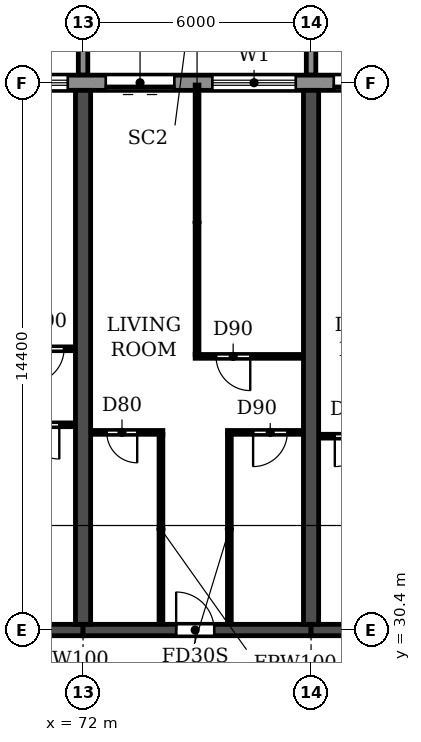
"""IFC4 building model, lengths in metres.
Left out: names, types, materials, properties, quantities, classifications, styles, units other than length and angle.
Written with IfcOpenShell. Run it as: python <this file> out.ifc"""

import sys

from ifc_helpers import new_model, si_unit, direction, frame, frame_2d, origin, place, context, subcontext, project, spatial, polyline, rectangle, outline, extrude, source, transform, mapped, element, fill, save


model = new_model("IFC4")
c1 = context("Model", 3, precision=1e-05, world=origin(), true_north=direction((0.0, 1.0)))
c2 = subcontext(c1, "Body", "Model", "MODEL_VIEW")
j1 = project(units=[si_unit("LENGTHUNIT", "METRE"), si_unit("PLANEANGLEUNIT", "RADIAN")], contexts=[c1])
p1 = place(None, origin())
s1 = spatial("IfcSite", under=j1, at=p1, CompositionType="ELEMENT")
p2 = place(p1, origin())
s2 = spatial("IfcBuilding", under=s1, at=p2, CompositionType="ELEMENT")
p3 = place(p2, frame((0.0, 0.0, 63.0)))
s3 = spatial("IfcBuildingStorey", under=s2, at=p3, CompositionType="ELEMENT", Elevation=63.0)
for number, where, z_axis, x_axis in (
    (1, (72.0, 30.55, 0.0), (0.0, 0.0, 1.0), (0.0, 1.0, 0.0)),
    (2, (78.0, 30.55, 0.0), (0.0, 0.0, 1.0), (0.0, 1.0, 0.0)),
):
    element("IfcWall", number, at=place(p3, frame(where, z_axis=z_axis, x_axis=x_axis)), inside=s3, PredefinedType="SHEAR", context=c2, shape_type="SweptSolid", body=[
        extrude(rectangle(XDim=14.05, YDim=0.4, at=frame_2d((7.025, 0.0))), origin(), (0.0, 0.0, 1.0), 2.95),
    ])
p4 = place(p3, frame((66.0, 30.4, 0.0), z_axis=(0.0, 0.0, 1.0), x_axis=(1.0, 0.0, 0.0)))
e3 = element("IfcWall", 3, at=p4, inside=s3, PredefinedType="SHEAR", context=c2, shape_type="SweptSolid", body=[
    extrude(rectangle(XDim=6.0, YDim=0.3, at=frame_2d((3.0, 0.0))), origin(), (0.0, 0.0, 1.0), 2.35),
])
p5 = place(p4, frame((2.45, 0.0, 0.0)))
e4 = element("IfcOpeningElement", 4, at=p5, cuts=e3, PredefinedType="OPENING", context=c2, shape_type="SweptSolid", body=[
    extrude(rectangle(XDim=1.0, YDim=2.1, at=frame_2d((0.5, 1.05))), frame((0.0, 0.16, 0.0), z_axis=(0.0, -1.0, 0.0), x_axis=(1.0, 0.0, 0.0)), (0.0, 0.0, 1.0), 0.32),
])
p6 = place(p3, frame((72.0, 30.4, 0.0), z_axis=(0.0, 0.0, 1.0), x_axis=(1.0, 0.0, 0.0)))
e5 = element("IfcWall", 5, at=p6, inside=s3, PredefinedType="SHEAR", context=c2, shape_type="SweptSolid", body=[
    extrude(rectangle(XDim=6.0, YDim=0.3, at=frame_2d((3.0, 0.0))), origin(), (0.0, 0.0, 1.0), 2.35),
])
p7 = place(p6, frame((2.45, 0.0, 0.0)))
e6 = element("IfcOpeningElement", 6, at=p7, cuts=e5, PredefinedType="OPENING", context=c2, shape_type="SweptSolid", body=[
    extrude(rectangle(XDim=1.0, YDim=2.1, at=frame_2d((0.5, 1.05))), frame((0.0, 0.16, 0.0), z_axis=(0.0, -1.0, 0.0), x_axis=(1.0, 0.0, 0.0)), (0.0, 0.0, 1.0), 0.32),
])
p8 = place(p3, frame((78.0, 30.4, 0.0), z_axis=(0.0, 0.0, 1.0), x_axis=(1.0, 0.0, 0.0)))
e7 = element("IfcWall", 7, at=p8, inside=s3, PredefinedType="SHEAR", context=c2, shape_type="SweptSolid", body=[
    extrude(rectangle(XDim=6.0, YDim=0.3, at=frame_2d((3.0, 0.0))), origin(), (0.0, 0.0, 1.0), 2.35),
])
p9 = place(p8, frame((2.45, 0.0, 0.0)))
e8 = element("IfcOpeningElement", 8, at=p9, cuts=e7, PredefinedType="OPENING", context=c2, shape_type="SweptSolid", body=[
    extrude(rectangle(XDim=1.0, YDim=2.1, at=frame_2d((0.5, 1.05))), frame((0.0, 0.16, 0.0), z_axis=(0.0, -1.0, 0.0), x_axis=(1.0, 0.0, 0.0)), (0.0, 0.0, 1.0), 0.32),
])
p10 = place(p3, frame((91.317, 44.8, 0.0), z_axis=(0.0, 0.0, 1.0), x_axis=(-1.0, 0.0, 0.0)))
e9 = element("IfcWall", 9, at=p10, inside=s3, PredefinedType="STANDARD", context=c2, shape_type="SweptSolid", body=[
    extrude(rectangle(XDim=80.634, YDim=0.4, at=frame_2d((40.317, 0.0))), origin(), (0.0, 0.0, 1.0), 2.95),
])
p11 = place(p10, frame((76.717, 0.0, 0.9)))
e10 = element("IfcOpeningElement", 10, at=p11, cuts=e9, PredefinedType="OPENING", context=c2, shape_type="SweptSolid", body=[
    extrude(rectangle(XDim=2.2, YDim=1.5, at=frame_2d((1.1, 0.75))), frame((0.0, 0.21, 0.0), z_axis=(0.0, -1.0, 0.0), x_axis=(1.0, 0.0, 0.0)), (0.0, 0.0, 1.0), 0.42),
])
p12 = place(p10, frame((73.917, 0.0, 0.0)))
e11 = element("IfcOpeningElement", 11, at=p12, cuts=e9, PredefinedType="OPENING", context=c2, shape_type="SweptSolid", body=[
    extrude(rectangle(XDim=1.8, YDim=2.4, at=frame_2d((0.9, 1.2))), frame((0.0, 0.21, 0.0), z_axis=(0.0, -1.0, 0.0), x_axis=(1.0, 0.0, 0.0)), (0.0, 0.0, 1.0), 0.42),
])
p13 = place(p10, frame((70.717, 0.0, 0.9)))
e12 = element("IfcOpeningElement", 12, at=p13, cuts=e9, PredefinedType="OPENING", context=c2, shape_type="SweptSolid", body=[
    extrude(rectangle(XDim=2.2, YDim=1.5, at=frame_2d((1.1, 0.75))), frame((0.0, 0.21, 0.0), z_axis=(0.0, -1.0, 0.0), x_axis=(1.0, 0.0, 0.0)), (0.0, 0.0, 1.0), 0.42),
])
p14 = place(p10, frame((67.917, 0.0, 0.0)))
e13 = element("IfcOpeningElement", 13, at=p14, cuts=e9, PredefinedType="OPENING", context=c2, shape_type="SweptSolid", body=[
    extrude(rectangle(XDim=1.8, YDim=2.4, at=frame_2d((0.9, 1.2))), frame((0.0, 0.21, 0.0), z_axis=(0.0, -1.0, 0.0), x_axis=(1.0, 0.0, 0.0)), (0.0, 0.0, 1.0), 0.42),
])
p15 = place(p10, frame((64.717, 0.0, 0.9)))
e14 = element("IfcOpeningElement", 14, at=p15, cuts=e9, PredefinedType="OPENING", context=c2, shape_type="SweptSolid", body=[
    extrude(rectangle(XDim=2.2, YDim=1.5, at=frame_2d((1.1, 0.75))), frame((0.0, 0.21, 0.0), z_axis=(0.0, -1.0, 0.0), x_axis=(1.0, 0.0, 0.0)), (0.0, 0.0, 1.0), 0.42),
])
p16 = place(p10, frame((61.917, 0.0, 0.0)))
e15 = element("IfcOpeningElement", 15, at=p16, cuts=e9, PredefinedType="OPENING", context=c2, shape_type="SweptSolid", body=[
    extrude(rectangle(XDim=1.8, YDim=2.4, at=frame_2d((0.9, 1.2))), frame((0.0, 0.21, 0.0), z_axis=(0.0, -1.0, 0.0), x_axis=(1.0, 0.0, 0.0)), (0.0, 0.0, 1.0), 0.42),
])
p17 = place(p10, frame((58.717, 0.0, 0.9)))
e16 = element("IfcOpeningElement", 16, at=p17, cuts=e9, PredefinedType="OPENING", context=c2, shape_type="SweptSolid", body=[
    extrude(rectangle(XDim=2.2, YDim=1.5, at=frame_2d((1.1, 0.75))), frame((0.0, 0.21, 0.0), z_axis=(0.0, -1.0, 0.0), x_axis=(1.0, 0.0, 0.0)), (0.0, 0.0, 1.0), 0.42),
])
p18 = place(p10, frame((55.717, 0.0, 0.9)))
e17 = element("IfcOpeningElement", 17, at=p18, cuts=e9, PredefinedType="OPENING", context=c2, shape_type="SweptSolid", body=[
    extrude(rectangle(XDim=2.2, YDim=1.5, at=frame_2d((1.1, 0.75))), frame((0.0, 0.21, 0.0), z_axis=(0.0, -1.0, 0.0), x_axis=(1.0, 0.0, 0.0)), (0.0, 0.0, 1.0), 0.42),
])
p19 = place(p10, frame((52.917, 0.0, 0.0)))
e18 = element("IfcOpeningElement", 18, at=p19, cuts=e9, PredefinedType="OPENING", context=c2, shape_type="SweptSolid", body=[
    extrude(rectangle(XDim=1.8, YDim=2.4, at=frame_2d((0.9, 1.2))), frame((0.0, 0.21, 0.0), z_axis=(0.0, -1.0, 0.0), x_axis=(1.0, 0.0, 0.0)), (0.0, 0.0, 1.0), 0.42),
])
p20 = place(p10, frame((49.717, 0.0, 0.9)))
e19 = element("IfcOpeningElement", 19, at=p20, cuts=e9, PredefinedType="OPENING", context=c2, shape_type="SweptSolid", body=[
    extrude(rectangle(XDim=2.2, YDim=1.5, at=frame_2d((1.1, 0.75))), frame((0.0, 0.21, 0.0), z_axis=(0.0, -1.0, 0.0), x_axis=(1.0, 0.0, 0.0)), (0.0, 0.0, 1.0), 0.42),
])
p21 = place(p10, frame((46.917, 0.0, 0.0)))
e20 = element("IfcOpeningElement", 20, at=p21, cuts=e9, PredefinedType="OPENING", context=c2, shape_type="SweptSolid", body=[
    extrude(rectangle(XDim=1.8, YDim=2.4, at=frame_2d((0.9, 1.2))), frame((0.0, 0.21, 0.0), z_axis=(0.0, -1.0, 0.0), x_axis=(1.0, 0.0, 0.0)), (0.0, 0.0, 1.0), 0.42),
])
p22 = place(p10, frame((43.717, 0.0, 0.9)))
e21 = element("IfcOpeningElement", 21, at=p22, cuts=e9, PredefinedType="OPENING", context=c2, shape_type="SweptSolid", body=[
    extrude(rectangle(XDim=2.2, YDim=1.5, at=frame_2d((1.1, 0.75))), frame((0.0, 0.21, 0.0), z_axis=(0.0, -1.0, 0.0), x_axis=(1.0, 0.0, 0.0)), (0.0, 0.0, 1.0), 0.42),
])
p23 = place(p10, frame((40.717, 0.0, 0.9)))
e22 = element("IfcOpeningElement", 22, at=p23, cuts=e9, PredefinedType="OPENING", context=c2, shape_type="SweptSolid", body=[
    extrude(rectangle(XDim=2.2, YDim=1.5, at=frame_2d((1.1, 0.75))), frame((0.0, 0.21, 0.0), z_axis=(0.0, -1.0, 0.0), x_axis=(1.0, 0.0, 0.0)), (0.0, 0.0, 1.0), 0.42),
])
p24 = place(p10, frame((37.717, 0.0, 0.9)))
e23 = element("IfcOpeningElement", 23, at=p24, cuts=e9, PredefinedType="OPENING", context=c2, shape_type="SweptSolid", body=[
    extrude(rectangle(XDim=2.2, YDim=1.5, at=frame_2d((1.1, 0.75))), frame((0.0, 0.21, 0.0), z_axis=(0.0, -1.0, 0.0), x_axis=(1.0, 0.0, 0.0)), (0.0, 0.0, 1.0), 0.42),
])
p25 = place(p10, frame((34.717, 0.0, 0.9)))
e24 = element("IfcOpeningElement", 24, at=p25, cuts=e9, PredefinedType="OPENING", context=c2, shape_type="SweptSolid", body=[
    extrude(rectangle(XDim=2.2, YDim=1.5, at=frame_2d((1.1, 0.75))), frame((0.0, 0.21, 0.0), z_axis=(0.0, -1.0, 0.0), x_axis=(1.0, 0.0, 0.0)), (0.0, 0.0, 1.0), 0.42),
])
p26 = place(p10, frame((31.917, 0.0, 0.0)))
e25 = element("IfcOpeningElement", 25, at=p26, cuts=e9, PredefinedType="OPENING", context=c2, shape_type="SweptSolid", body=[
    extrude(rectangle(XDim=1.8, YDim=2.4, at=frame_2d((0.9, 1.2))), frame((0.0, 0.21, 0.0), z_axis=(0.0, -1.0, 0.0), x_axis=(1.0, 0.0, 0.0)), (0.0, 0.0, 1.0), 0.42),
])
p27 = place(p10, frame((28.917, 0.0, 0.0)))
e26 = element("IfcOpeningElement", 26, at=p27, cuts=e9, PredefinedType="OPENING", context=c2, shape_type="SweptSolid", body=[
    extrude(rectangle(XDim=1.8, YDim=2.4, at=frame_2d((0.9, 1.2))), frame((0.0, 0.21, 0.0), z_axis=(0.0, -1.0, 0.0), x_axis=(1.0, 0.0, 0.0)), (0.0, 0.0, 1.0), 0.42),
])
p28 = place(p10, frame((25.717, 0.0, 0.9)))
e27 = element("IfcOpeningElement", 27, at=p28, cuts=e9, PredefinedType="OPENING", context=c2, shape_type="SweptSolid", body=[
    extrude(rectangle(XDim=2.2, YDim=1.5, at=frame_2d((1.1, 0.75))), frame((0.0, 0.21, 0.0), z_axis=(0.0, -1.0, 0.0), x_axis=(1.0, 0.0, 0.0)), (0.0, 0.0, 1.0), 0.42),
])
p29 = place(p10, frame((22.917, 0.0, 0.0)))
e28 = element("IfcOpeningElement", 28, at=p29, cuts=e9, PredefinedType="OPENING", context=c2, shape_type="SweptSolid", body=[
    extrude(rectangle(XDim=1.8, YDim=2.4, at=frame_2d((0.9, 1.2))), frame((0.0, 0.21, 0.0), z_axis=(0.0, -1.0, 0.0), x_axis=(1.0, 0.0, 0.0)), (0.0, 0.0, 1.0), 0.42),
])
p30 = place(p10, frame((19.717, 0.0, 0.9)))
e29 = element("IfcOpeningElement", 29, at=p30, cuts=e9, PredefinedType="OPENING", context=c2, shape_type="SweptSolid", body=[
    extrude(rectangle(XDim=2.2, YDim=1.5, at=frame_2d((1.1, 0.75))), frame((0.0, 0.21, 0.0), z_axis=(0.0, -1.0, 0.0), x_axis=(1.0, 0.0, 0.0)), (0.0, 0.0, 1.0), 0.42),
])
p31 = place(p10, frame((16.917, 0.0, 0.0)))
e30 = element("IfcOpeningElement", 30, at=p31, cuts=e9, PredefinedType="OPENING", context=c2, shape_type="SweptSolid", body=[
    extrude(rectangle(XDim=1.8, YDim=2.4, at=frame_2d((0.9, 1.2))), frame((0.0, 0.21, 0.0), z_axis=(0.0, -1.0, 0.0), x_axis=(1.0, 0.0, 0.0)), (0.0, 0.0, 1.0), 0.42),
])
p32 = place(p10, frame((13.717, 0.0, 0.9)))
e31 = element("IfcOpeningElement", 31, at=p32, cuts=e9, PredefinedType="OPENING", context=c2, shape_type="SweptSolid", body=[
    extrude(rectangle(XDim=2.2, YDim=1.5, at=frame_2d((1.1, 0.75))), frame((0.0, 0.21, 0.0), z_axis=(0.0, -1.0, 0.0), x_axis=(1.0, 0.0, 0.0)), (0.0, 0.0, 1.0), 0.42),
])
p33 = place(p10, frame((10.917, 0.0, 0.0)))
e32 = element("IfcOpeningElement", 32, at=p33, cuts=e9, PredefinedType="OPENING", context=c2, shape_type="SweptSolid", body=[
    extrude(rectangle(XDim=1.8, YDim=2.4, at=frame_2d((0.9, 1.2))), frame((0.0, 0.21, 0.0), z_axis=(0.0, -1.0, 0.0), x_axis=(1.0, 0.0, 0.0)), (0.0, 0.0, 1.0), 0.42),
])
p34 = place(p10, frame((7.717, 0.0, 0.9)))
e33 = element("IfcOpeningElement", 33, at=p34, cuts=e9, PredefinedType="OPENING", context=c2, shape_type="SweptSolid", body=[
    extrude(rectangle(XDim=2.2, YDim=1.5, at=frame_2d((1.1, 0.75))), frame((0.0, 0.21, 0.0), z_axis=(0.0, -1.0, 0.0), x_axis=(1.0, 0.0, 0.0)), (0.0, 0.0, 1.0), 0.42),
])
p35 = place(p10, frame((4.717, 0.0, 0.9)))
e34 = element("IfcOpeningElement", 34, at=p35, cuts=e9, PredefinedType="OPENING", context=c2, shape_type="SweptSolid", body=[
    extrude(rectangle(XDim=2.2, YDim=1.5, at=frame_2d((1.1, 0.75))), frame((0.0, 0.21, 0.0), z_axis=(0.0, -1.0, 0.0), x_axis=(1.0, 0.0, 0.0)), (0.0, 0.0, 1.0), 0.42),
])
p36 = place(p10, frame((1.717, 0.0, 0.9)))
e35 = element("IfcOpeningElement", 35, at=p36, cuts=e9, PredefinedType="OPENING", context=c2, shape_type="SweptSolid", body=[
    extrude(rectangle(XDim=2.2, YDim=1.5, at=frame_2d((1.1, 0.75))), frame((0.0, 0.21, 0.0), z_axis=(0.0, -1.0, 0.0), x_axis=(1.0, 0.0, 0.0)), (0.0, 0.0, 1.0), 0.42),
])
m1 = source(origin(), c2, "Body", "SweptSolid", [
    extrude(outline(polyline([(0.0, 0.0), (0.25, 0.0), (0.25, 3.1), (0.0, 3.1), (0.0, 0.0)])), origin(), (0.0, 0.0, 1.0), 3.1),
])
for number, where in (
    (36, (71.875, 45.0, 0.0)),
    (37, (77.875, 45.0, 0.0)),
):
    element("IfcWall", number, at=place(p3, frame(where)), inside=s3, PredefinedType="STANDARD", context=c2, shape_type="MappedRepresentation", body=[
        mapped(m1, transform((0.0, 0.0, 0.0))),
    ])
p37 = place(p3, frame((78.21, 35.5, 0.0), z_axis=(0.0, 0.0, 1.0), x_axis=(1.0, 0.0, 0.0)))
e38 = element("IfcWall", 38, at=p37, inside=s3, PredefinedType="PARTITIONING", context=c2, shape_type="SweptSolid", body=[
    extrude(rectangle(XDim=1.89, YDim=0.1, at=frame_2d((0.945, 0.0))), origin(), (0.0, 0.0, 1.0), 2.95),
])
p38 = place(p37, frame((0.415, 0.0, 0.0)))
e39 = element("IfcOpeningElement", 39, at=p38, cuts=e38, PredefinedType="OPENING", context=c2, shape_type="SweptSolid", body=[
    extrude(rectangle(XDim=0.8, YDim=2.1, at=frame_2d((0.4, 1.05))), frame((0.0, 0.06, 0.0), z_axis=(0.0, -1.0, 0.0), x_axis=(1.0, 0.0, 0.0)), (0.0, 0.0, 1.0), 0.12),
])
p39 = place(p3, frame((72.21, 35.6, 0.0), z_axis=(0.0, 0.0, 1.0), x_axis=(1.0, 0.0, 0.0)))
e40 = element("IfcWall", 40, at=p39, inside=s3, PredefinedType="PARTITIONING", context=c2, shape_type="SweptSolid", body=[
    extrude(rectangle(XDim=1.89, YDim=0.1, at=frame_2d((0.945, 0.0))), origin(), (0.0, 0.0, 1.0), 2.95),
])
p40 = place(p39, frame((0.415, 0.0, 0.0)))
e41 = element("IfcOpeningElement", 41, at=p40, cuts=e40, PredefinedType="OPENING", context=c2, shape_type="SweptSolid", body=[
    extrude(rectangle(XDim=0.8, YDim=2.1, at=frame_2d((0.4, 1.05))), frame((0.0, 0.06, 0.0), z_axis=(0.0, -1.0, 0.0), x_axis=(1.0, 0.0, 0.0)), (0.0, 0.0, 1.0), 0.12),
])
p41 = place(p3, frame((75.8, 35.6, 0.0), z_axis=(0.0, 0.0, 1.0), x_axis=(1.0, 0.0, 0.0)))
e42 = element("IfcWall", 42, at=p41, inside=s3, PredefinedType="PARTITIONING", context=c2, shape_type="SweptSolid", body=[
    extrude(rectangle(XDim=1.99, YDim=0.1, at=frame_2d((0.995, 0.0))), origin(), (0.0, 0.0, 1.0), 2.95),
])
p42 = place(p41, frame((0.675, 0.0, 0.0)))
e43 = element("IfcOpeningElement", 43, at=p42, cuts=e42, PredefinedType="OPENING", context=c2, shape_type="SweptSolid", body=[
    extrude(rectangle(XDim=0.9, YDim=2.1, at=frame_2d((0.45, 1.05))), frame((0.0, 0.06, 0.0), z_axis=(0.0, -1.0, 0.0), x_axis=(1.0, 0.0, 0.0)), (0.0, 0.0, 1.0), 0.12),
])
p43 = place(p3, frame((69.8, 35.8, 0.0), z_axis=(0.0, 0.0, 1.0), x_axis=(1.0, 0.0, 0.0)))
e44 = element("IfcWall", 44, at=p43, inside=s3, PredefinedType="PARTITIONING", context=c2, shape_type="SweptSolid", body=[
    extrude(rectangle(XDim=1.99, YDim=0.1, at=frame_2d((0.995, 0.0))), origin(), (0.0, 0.0, 1.0), 2.95),
])
p44 = place(p43, frame((0.675, 0.0, 0.0)))
e45 = element("IfcOpeningElement", 45, at=p44, cuts=e44, PredefinedType="OPENING", context=c2, shape_type="SweptSolid", body=[
    extrude(rectangle(XDim=0.9, YDim=2.1, at=frame_2d((0.45, 1.05))), frame((0.0, 0.06, 0.0), z_axis=(0.0, -1.0, 0.0), x_axis=(1.0, 0.0, 0.0)), (0.0, 0.0, 1.0), 0.12),
])
p45 = place(p3, frame((74.95, 37.6, 0.0), z_axis=(0.0, 0.0, 1.0), x_axis=(1.0, 0.0, 0.0)))
e46 = element("IfcWall", 46, at=p45, inside=s3, PredefinedType="PARTITIONING", context=c2, shape_type="SweptSolid", body=[
    extrude(rectangle(XDim=2.84, YDim=0.1, at=frame_2d((1.42, 0.0))), origin(), (0.0, 0.0, 1.0), 2.95),
])
p46 = place(p45, frame((0.55, 0.0, 0.0)))
e47 = element("IfcOpeningElement", 47, at=p46, cuts=e46, PredefinedType="OPENING", context=c2, shape_type="SweptSolid", body=[
    extrude(rectangle(XDim=0.9, YDim=2.1, at=frame_2d((0.45, 1.05))), frame((0.0, 0.06, 0.0), z_axis=(0.0, -1.0, 0.0), x_axis=(1.0, 0.0, 0.0)), (0.0, 0.0, 1.0), 0.12),
])
p47 = place(p3, frame((68.95, 37.8, 0.0), z_axis=(0.0, 0.0, 1.0), x_axis=(1.0, 0.0, 0.0)))
e48 = element("IfcWall", 48, at=p47, inside=s3, PredefinedType="PARTITIONING", context=c2, shape_type="SweptSolid", body=[
    extrude(rectangle(XDim=2.84, YDim=0.1, at=frame_2d((1.42, 0.0))), origin(), (0.0, 0.0, 1.0), 2.95),
])
p48 = place(p47, frame((1.65, 0.0, 0.0)))
e49 = element("IfcOpeningElement", 49, at=p48, cuts=e48, PredefinedType="OPENING", context=c2, shape_type="SweptSolid", body=[
    extrude(rectangle(XDim=0.9, YDim=2.1, at=frame_2d((0.45, 1.05))), frame((0.0, 0.06, 0.0), z_axis=(0.0, -1.0, 0.0), x_axis=(1.0, 0.0, 0.0)), (0.0, 0.0, 1.0), 0.12),
])
p49 = place(p3, frame((74.05, 30.56, 0.0), z_axis=(0.0, 0.0, 1.0), x_axis=(0.0, 1.0, 0.0)))
e50 = element("IfcWall", 50, at=p49, inside=s3, PredefinedType="PARTITIONING", context=c2, shape_type="SweptSolid", body=[
    extrude(rectangle(XDim=4.99, YDim=0.1, at=frame_2d((2.495, 0.0))), origin(), (0.0, 0.0, 1.0), 2.95),
])
p50 = place(p3, frame((75.0, 37.65, 0.0), z_axis=(0.0, 0.0, 1.0), x_axis=(0.0, 1.0, 0.0)))
e51 = element("IfcWall", 51, at=p50, inside=s3, PredefinedType="PARTITIONING", context=c2, shape_type="SweptSolid", body=[
    extrude(rectangle(XDim=7.09, YDim=0.1, at=frame_2d((3.545, 0.0))), origin(), (0.0, 0.0, 1.0), 2.95),
])
p51 = place(p3, frame((75.85, 30.56, 0.0), z_axis=(0.0, 0.0, 1.0), x_axis=(0.0, 1.0, 0.0)))
e52 = element("IfcWall", 52, at=p51, inside=s3, PredefinedType="PARTITIONING", context=c2, shape_type="SweptSolid", body=[
    extrude(rectangle(XDim=4.99, YDim=0.1, at=frame_2d((2.495, 0.0))), origin(), (0.0, 0.0, 1.0), 2.95),
])
p52 = place(p30, origin())
e53 = element("IfcWindow", 53, at=p52, inside=s3, PartitioningType="DOUBLE_PANEL_HORIZONTAL", PredefinedType="WINDOW", context=c2, shape_type="SweptSolid", body=[
    extrude(rectangle(XDim=2.2, YDim=1.5, at=frame_2d((1.1, 0.75))), frame((0.0, 0.03, 0.0), z_axis=(0.0, -1.0, 0.0), x_axis=(1.0, 0.0, 0.0)), (0.0, 0.0, 1.0), 0.06),
])
fill(e29, e53)
p53 = place(p31, origin())
e54 = element("IfcDoor", 54, at=p53, inside=s3, OperationType="DOUBLE_DOOR_SLIDING", PredefinedType="DOOR", context=c2, shape_type="SweptSolid", body=[
    extrude(rectangle(XDim=1.8, YDim=2.4, at=frame_2d((0.9, 1.2))), frame((0.0, 0.025, 0.0), z_axis=(0.0, -1.0, 0.0), x_axis=(1.0, 0.0, 0.0)), (0.0, 0.0, 1.0), 0.05),
])
fill(e30, e54)
p54 = place(p32, origin())
e55 = element("IfcWindow", 55, at=p54, inside=s3, PartitioningType="DOUBLE_PANEL_HORIZONTAL", PredefinedType="WINDOW", context=c2, shape_type="SweptSolid", body=[
    extrude(rectangle(XDim=2.2, YDim=1.5, at=frame_2d((1.1, 0.75))), frame((0.0, 0.03, 0.0), z_axis=(0.0, -1.0, 0.0), x_axis=(1.0, 0.0, 0.0)), (0.0, 0.0, 1.0), 0.06),
])
fill(e31, e55)
p55 = place(p33, origin())
e56 = element("IfcDoor", 56, at=p55, inside=s3, OperationType="DOUBLE_DOOR_SLIDING", PredefinedType="DOOR", context=c2, shape_type="SweptSolid", body=[
    extrude(rectangle(XDim=1.8, YDim=2.4, at=frame_2d((0.9, 1.2))), frame((0.0, 0.025, 0.0), z_axis=(0.0, -1.0, 0.0), x_axis=(1.0, 0.0, 0.0)), (0.0, 0.0, 1.0), 0.05),
])
fill(e32, e56)
p56 = place(p44, frame((0.9, 0.0, 0.0), z_axis=(0.0, 0.0, 1.0), x_axis=(-1.0, 0.0, 0.0)))
e57 = element("IfcDoor", 57, at=p56, inside=s3, OperationType="SINGLE_SWING_LEFT", PredefinedType="DOOR", context=c2, shape_type="SweptSolid", body=[
    extrude(rectangle(XDim=0.9, YDim=2.1, at=frame_2d((0.45, 1.05))), frame((0.0, 0.025, 0.0), z_axis=(0.0, -1.0, 0.0), x_axis=(1.0, 0.0, 0.0)), (0.0, 0.0, 1.0), 0.05),
])
fill(e45, e57)
p57 = place(p48, frame((0.9, 0.0, 0.0), z_axis=(0.0, 0.0, 1.0), x_axis=(-1.0, 0.0, 0.0)))
e58 = element("IfcDoor", 58, at=p57, inside=s3, OperationType="SINGLE_SWING_RIGHT", PredefinedType="DOOR", context=c2, shape_type="SweptSolid", body=[
    extrude(rectangle(XDim=0.9, YDim=2.1, at=frame_2d((0.45, 1.05))), frame((0.0, 0.025, 0.0), z_axis=(0.0, -1.0, 0.0), x_axis=(1.0, 0.0, 0.0)), (0.0, 0.0, 1.0), 0.05),
])
fill(e49, e58)
p58 = place(p40, frame((0.8, 0.0, 0.0), z_axis=(0.0, 0.0, 1.0), x_axis=(-1.0, 0.0, 0.0)))
e59 = element("IfcDoor", 59, at=p58, inside=s3, OperationType="SINGLE_SWING_LEFT", PredefinedType="DOOR", context=c2, shape_type="SweptSolid", body=[
    extrude(rectangle(XDim=0.8, YDim=2.1, at=frame_2d((0.4, 1.05))), frame((0.0, 0.025, 0.0), z_axis=(0.0, -1.0, 0.0), x_axis=(1.0, 0.0, 0.0)), (0.0, 0.0, 1.0), 0.05),
])
fill(e41, e59)
p59 = place(p7, origin())
e60 = element("IfcDoor", 60, at=p59, inside=s3, OperationType="SINGLE_SWING_LEFT", PredefinedType="DOOR", context=c2, shape_type="SweptSolid", body=[
    extrude(rectangle(XDim=1.0, YDim=2.1, at=frame_2d((0.5, 1.05))), frame((0.0, 0.025, 0.0), z_axis=(0.0, -1.0, 0.0), x_axis=(1.0, 0.0, 0.0)), (0.0, 0.0, 1.0), 0.05),
])
fill(e6, e60)
p60 = place(p46, frame((0.9, 0.0, 0.0), z_axis=(0.0, 0.0, 1.0), x_axis=(-1.0, 0.0, 0.0)))
e61 = element("IfcDoor", 61, at=p60, inside=s3, OperationType="SINGLE_SWING_LEFT", PredefinedType="DOOR", context=c2, shape_type="SweptSolid", body=[
    extrude(rectangle(XDim=0.9, YDim=2.1, at=frame_2d((0.45, 1.05))), frame((0.0, 0.025, 0.0), z_axis=(0.0, -1.0, 0.0), x_axis=(1.0, 0.0, 0.0)), (0.0, 0.0, 1.0), 0.05),
])
fill(e47, e61)
p61 = place(p42, frame((0.9, 0.0, 0.0), z_axis=(0.0, 0.0, 1.0), x_axis=(-1.0, 0.0, 0.0)))
e62 = element("IfcDoor", 62, at=p61, inside=s3, OperationType="SINGLE_SWING_RIGHT", PredefinedType="DOOR", context=c2, shape_type="SweptSolid", body=[
    extrude(rectangle(XDim=0.9, YDim=2.1, at=frame_2d((0.45, 1.05))), frame((0.0, 0.025, 0.0), z_axis=(0.0, -1.0, 0.0), x_axis=(1.0, 0.0, 0.0)), (0.0, 0.0, 1.0), 0.05),
])
fill(e43, e62)
p62 = place(p38, frame((0.8, 0.0, 0.0), z_axis=(0.0, 0.0, 1.0), x_axis=(-1.0, 0.0, 0.0)))
e63 = element("IfcDoor", 63, at=p62, inside=s3, OperationType="SINGLE_SWING_RIGHT", PredefinedType="DOOR", context=c2, shape_type="SweptSolid", body=[
    extrude(rectangle(XDim=0.8, YDim=2.1, at=frame_2d((0.4, 1.05))), frame((0.0, 0.025, 0.0), z_axis=(0.0, -1.0, 0.0), x_axis=(1.0, 0.0, 0.0)), (0.0, 0.0, 1.0), 0.05),
])
fill(e39, e63)
save(model, sys.argv[1])
